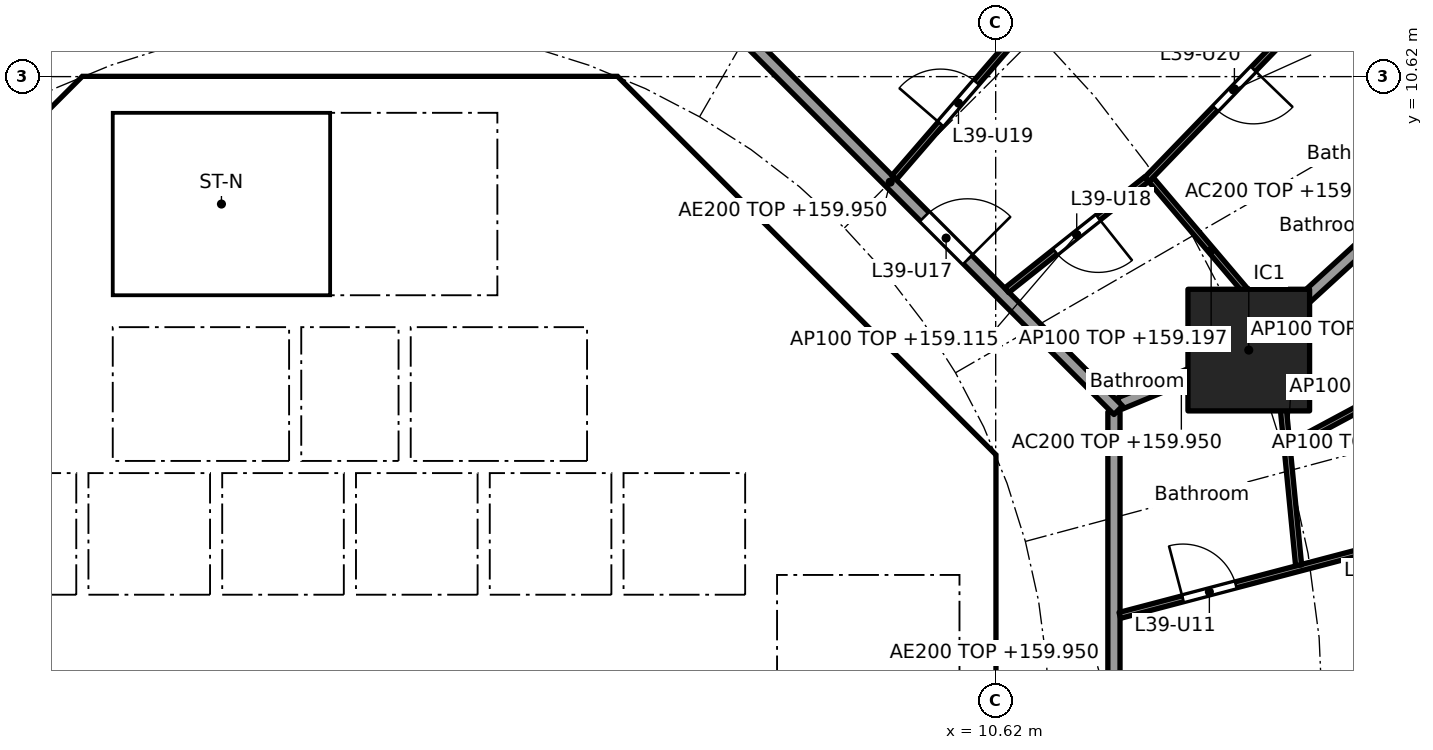
"""IFC4 building model, lengths in metres.
Left out: names, types, materials, properties, quantities, classifications, styles, units other than length and angle.
Written with IfcOpenShell. Run it as: python <this file> out.ifc"""

import sys

from ifc_helpers import new_model, si_unit, direction, frame, frame_2d, origin, origin_2d, place, context, subcontext, project, spatial, polyline, rectangle, outline, extrude, element, fill, save


model = new_model("IFC4")
c1 = context("Model", 3, precision=1e-05, world=origin(), true_north=direction((0.0, 1.0)))
c2 = subcontext(c1, "Body", "Model", "MODEL_VIEW")
j1 = project(units=[si_unit("LENGTHUNIT", "METRE"), si_unit("PLANEANGLEUNIT", "RADIAN")], contexts=[c1])
p1 = place(None, origin())
s1 = spatial("IfcSite", under=j1, at=p1, CompositionType="ELEMENT")
p2 = place(p1, origin())
s2 = spatial("IfcBuilding", under=s1, at=p2, CompositionType="ELEMENT")
p3 = place(p2, frame((0.0, 0.0, 156.6)))
s3 = spatial("IfcBuildingStorey", under=s2, at=p3, CompositionType="ELEMENT", Elevation=156.6)
p4 = place(p3, frame((14.782, 6.123, 0.0), z_axis=(0.0, 0.0, 1.0), x_axis=(1.0, 0.0, 0.0)))
e1 = element("IfcColumn", 1, at=p4, inside=s3, PredefinedType="COLUMN", context=c2, shape_type="SweptSolid", body=[
    extrude(rectangle(XDim=2.0, YDim=2.0, at=origin_2d()), origin(), (0.0, 0.0, 1.0), 3.7),
])
p5 = place(p3, frame((9.988, 4.613, 0.0), z_axis=(0.0, 0.0, 1.0), x_axis=(-0.707106781187, 0.707106781187, 0.0)))
e2 = element("IfcWall", 2, at=p5, inside=s3, PredefinedType="SHEAR", context=c2, shape_type="SweptSolid", body=[
    extrude(rectangle(XDim=7.602, YDim=0.6, at=frame_2d((3.801, 0.0))), origin(), (0.0, 0.0, 1.0), 3.35),
])
p6 = place(p5, frame((3.201, 0.0, 0.0)))
e3 = element("IfcOpeningElement", 3, at=p6, cuts=e2, PredefinedType="OPENING", context=c2, shape_type="SweptSolid", body=[
    extrude(rectangle(XDim=1.2, YDim=2.1, at=frame_2d((0.6, 1.05))), frame((0.0, 0.31, 0.0), z_axis=(0.0, -1.0, 0.0), x_axis=(1.0, 0.0, 0.0)), (0.0, 0.0, 1.0), 0.62),
])
p7 = place(p3, frame((-4.613, 9.988, 0.0), z_axis=(0.0, 0.0, 1.0), x_axis=(-0.707106781187, -0.707106781187, 0.0)))
e4 = element("IfcWall", 4, at=p7, inside=s3, PredefinedType="SHEAR", context=c2, shape_type="SweptSolid", body=[
    extrude(rectangle(XDim=7.602, YDim=0.6, at=frame_2d((3.801, 0.0))), origin(), (0.0, 0.0, 1.0), 3.35),
])
p8 = place(p7, frame((0.351, 0.0, 0.0)))
e5 = element("IfcOpeningElement", 5, at=p8, cuts=e4, PredefinedType="OPENING", context=c2, shape_type="SweptSolid", body=[
    extrude(rectangle(XDim=1.1, YDim=2.1, at=frame_2d((0.55, 1.05))), frame((0.0, 0.31, 0.0), z_axis=(0.0, -1.0, 0.0), x_axis=(1.0, 0.0, 0.0)), (0.0, 0.0, 1.0), 0.62),
])
p9 = place(p3, frame((4.0, 4.3, 0.0), z_axis=(0.0, 0.0, 1.0), x_axis=(0.0, 1.0, 0.0)))
e6 = element("IfcWall", 6, at=p9, inside=s3, PredefinedType="SOLIDWALL", context=c2, shape_type="SweptSolid", body=[
    extrude(rectangle(XDim=2.2, YDim=0.2, at=frame_2d((1.1, 0.0))), origin(), (0.0, 0.0, 1.0), 3.35),
])
p10 = place(p9, frame((0.55, 0.0, 0.0)))
e7 = element("IfcOpeningElement", 7, at=p10, cuts=e6, PredefinedType="OPENING", context=c2, shape_type="SweptSolid", body=[
    extrude(rectangle(XDim=1.1, YDim=2.1, at=frame_2d((0.55, 1.05))), frame((0.0, 0.11, 0.0), z_axis=(0.0, -1.0, 0.0), x_axis=(1.0, 0.0, 0.0)), (0.0, 0.0, 1.0), 0.22),
])
p11 = place(p3, frame((-4.0, 4.3, 0.0), z_axis=(0.0, 0.0, 1.0), x_axis=(0.0, 1.0, 0.0)))
e8 = element("IfcWall", 8, at=p11, inside=s3, PredefinedType="SOLIDWALL", context=c2, shape_type="SweptSolid", body=[
    extrude(rectangle(XDim=2.2, YDim=0.2, at=frame_2d((1.1, 0.0))), origin(), (0.0, 0.0, 1.0), 3.35),
])
p12 = place(p11, frame((0.55, 0.0, 0.0)))
e9 = element("IfcOpeningElement", 9, at=p12, cuts=e8, PredefinedType="OPENING", context=c2, shape_type="SweptSolid", body=[
    extrude(rectangle(XDim=1.1, YDim=2.1, at=frame_2d((0.55, 1.05))), frame((0.0, 0.11, 0.0), z_axis=(0.0, -1.0, 0.0), x_axis=(1.0, 0.0, 0.0)), (0.0, 0.0, 1.0), 0.22),
])
p13 = place(p3, frame((-6.7, 2.0, 0.0), z_axis=(0.0, 0.0, 1.0), x_axis=(1.0, 0.0, 0.0)))
e10 = element("IfcWall", 10, at=p13, inside=s3, PredefinedType="SOLIDWALL", context=c2, shape_type="SweptSolid", body=[
    extrude(rectangle(XDim=13.4, YDim=0.2, at=frame_2d((6.7, 0.0))), origin(), (0.0, 0.0, 1.0), 3.35),
])
p14 = place(p13, frame((0.65, 0.0, 0.0)))
e11 = element("IfcOpeningElement", 11, at=p14, cuts=e10, PredefinedType="OPENING", context=c2, shape_type="SweptSolid", body=[
    extrude(rectangle(XDim=1.1, YDim=2.1, at=frame_2d((0.55, 1.05))), frame((0.0, 0.11, 0.0), z_axis=(0.0, -1.0, 0.0), x_axis=(1.0, 0.0, 0.0)), (0.0, 0.0, 1.0), 0.22),
])
p15 = place(p13, frame((2.85, 0.0, 0.0)))
e12 = element("IfcOpeningElement", 12, at=p15, cuts=e10, PredefinedType="OPENING", context=c2, shape_type="SweptSolid", body=[
    extrude(rectangle(XDim=1.1, YDim=2.1, at=frame_2d((0.55, 1.05))), frame((0.0, 0.11, 0.0), z_axis=(0.0, -1.0, 0.0), x_axis=(1.0, 0.0, 0.0)), (0.0, 0.0, 1.0), 0.22),
])
p16 = place(p13, frame((5.05, 0.0, 0.0)))
e13 = element("IfcOpeningElement", 13, at=p16, cuts=e10, PredefinedType="OPENING", context=c2, shape_type="SweptSolid", body=[
    extrude(rectangle(XDim=1.1, YDim=2.1, at=frame_2d((0.55, 1.05))), frame((0.0, 0.11, 0.0), z_axis=(0.0, -1.0, 0.0), x_axis=(1.0, 0.0, 0.0)), (0.0, 0.0, 1.0), 0.22),
])
p17 = place(p3, frame((6.7, 4.0, 0.0), z_axis=(0.0, 0.0, 1.0), x_axis=(1.0, 0.0, 0.0)))
e14 = element("IfcWall", 14, at=p17, inside=s3, PredefinedType="SOLIDWALL", context=c2, shape_type="SweptSolid", body=[
    extrude(rectangle(XDim=3.325, YDim=0.2, at=frame_2d((1.662, 0.0))), origin(), (0.0, 0.0, 1.0), 3.35),
])
p18 = place(p17, frame((1.25, 0.0, 0.0)))
e15 = element("IfcOpeningElement", 15, at=p18, cuts=e14, PredefinedType="OPENING", context=c2, shape_type="SweptSolid", body=[
    extrude(rectangle(XDim=1.1, YDim=2.1, at=frame_2d((0.55, 1.05))), frame((0.0, 0.11, 0.0), z_axis=(0.0, -1.0, 0.0), x_axis=(1.0, 0.0, 0.0)), (0.0, 0.0, 1.0), 0.22),
])
p19 = place(p3, frame((4.0, 7.025, 0.0), z_axis=(0.0, 0.0, 1.0), x_axis=(0.0, 1.0, 0.0)))
e16 = element("IfcWall", 16, at=p19, inside=s3, PredefinedType="SOLIDWALL", context=c2, shape_type="SweptSolid", body=[
    extrude(rectangle(XDim=3.0, YDim=0.2, at=frame_2d((1.5, 0.0))), origin(), (0.0, 0.0, 1.0), 3.35),
])
p20 = place(p19, frame((0.925, 0.0, 0.0)))
e17 = element("IfcOpeningElement", 17, at=p20, cuts=e16, PredefinedType="OPENING", context=c2, shape_type="SweptSolid", body=[
    extrude(rectangle(XDim=1.1, YDim=2.1, at=frame_2d((0.55, 1.05))), frame((0.0, 0.11, 0.0), z_axis=(0.0, -1.0, 0.0), x_axis=(1.0, 0.0, 0.0)), (0.0, 0.0, 1.0), 0.22),
])
p21 = place(p3, origin())
e18 = element("IfcWall", 18, at=p21, inside=s3, PredefinedType="SHEAR", context=c2, shape_type="SweptSolid", body=[
    extrude(outline(polyline([(-4.152, 10.025), (-4.401, 9.776), (-4.825, 10.2), (-4.401, 10.625), (4.401, 10.625), (4.825, 10.2), (4.401, 9.776), (4.152, 10.025), (-4.152, 10.025)])), origin(), (0.0, 0.0, 1.0), 3.35),
])
p22 = place(p3, origin())
e19 = element("IfcWall", 19, at=p22, inside=s3, PredefinedType="SHEAR", context=c2, shape_type="SweptSolid", body=[
    extrude(outline(polyline([(9.776, -4.401), (10.025, -4.152), (10.025, -3.801), (10.025, 4.152), (9.776, 4.401), (10.2, 4.825), (10.625, 4.401), (10.625, -4.401), (10.2, -4.825), (9.776, -4.401)])), origin(), (0.0, 0.0, 1.0), 3.35),
])
for number, where, z_axis, x_axis in (
    (20, (-0.9, 4.3, 0.0), (0.0, 0.0, 1.0), (0.0, 1.0, 0.0)),
    (21, (0.9, 4.3, 0.0), (0.0, 0.0, 1.0), (0.0, 1.0, 0.0)),
):
    element("IfcWall", number, at=place(p3, frame(where, z_axis=z_axis, x_axis=x_axis)), inside=s3, PredefinedType="SOLIDWALL", context=c2, shape_type="SweptSolid", body=[
        extrude(rectangle(XDim=2.2, YDim=0.2, at=frame_2d((1.1, 0.0))), origin(), (0.0, 0.0, 1.0), 3.35),
    ])
p23 = place(p3, origin())
e22 = element("IfcWall", 22, at=p23, inside=s3, PredefinedType="SOLIDWALL", context=c2, shape_type="SweptSolid", body=[
    extrude(outline(polyline([(-6.5, 2.1), (-6.7, 2.1), (-6.7, 4.3), (6.7, 4.3), (6.7, 2.1), (6.5, 2.1), (6.5, 4.1), (4.5, 4.1), (4.5, 2.1), (4.3, 2.1), (4.3, 4.1), (2.3, 4.1), (2.3, 2.1), (2.1, 2.1), (2.1, 4.1), (0.1, 4.1), (0.1, 2.1), (-0.1, 2.1), (-0.1, 4.1), (-2.1, 4.1), (-2.1, 2.1), (-2.3, 2.1), (-2.3, 4.1), (-4.3, 4.1), (-4.3, 2.1), (-4.5, 2.1), (-4.5, 4.1), (-6.5, 4.1), (-6.5, 2.1)])), origin(), (0.0, 0.0, 1.0), 3.35),
])
p24 = place(p3, origin())
e23 = element("IfcWall", 23, at=p24, inside=s3, PredefinedType="SOLIDWALL", context=c2, shape_type="SweptSolid", body=[
    extrude(outline(polyline([(-3.9, 7.025), (-4.1, 7.025), (-4.1, 10.025), (-3.9, 10.025), (-3.9, 7.025)])), origin(), (0.0, 0.0, 1.0), 3.35),
])
p25 = place(p3, origin())
e24 = element("IfcWall", 24, at=p25, inside=s3, PredefinedType="SOLIDWALL", context=c2, shape_type="SweptSolid", body=[
    extrude(outline(polyline([(4.1, 6.5), (-4.1, 6.5), (-4.1, 7.025), (4.1, 7.025), (4.1, 6.5)])), origin(), (0.0, 0.0, 1.0), 3.35),
])
p26 = place(p3, origin())
e25 = element("IfcWall", 25, at=p26, inside=s3, PredefinedType="SOLIDWALL", context=c2, shape_type="SweptSolid", body=[
    extrude(outline(polyline([(7.025, -3.9), (6.7, -3.9), (6.7, 3.9), (7.025, 3.9), (7.025, -3.9)])), origin(), (0.0, 0.0, 1.0), 3.35),
])
p27 = place(p3, frame((12.657, 5.243, 0.0), z_axis=(0.0, 0.0, 1.0), x_axis=(0.923876145736, 0.382691608661, 0.0)))
e26 = element("IfcWall", 26, at=p27, inside=s3, PredefinedType="PARTITIONING", context=c2, shape_type="SweptSolid", body=[
    extrude(rectangle(XDim=2.2, YDim=0.2, at=frame_2d((1.1, 0.0))), origin(), (0.0, 0.0, 1.0), 3.35),
])
p28 = place(p3, frame((14.819, 6.157, 0.0), z_axis=(0.0, 0.0, 1.0), x_axis=(0.737608883396, 0.675228209671, 0.0)))
e27 = element("IfcWall", 27, at=p28, inside=s3, PredefinedType="PARTITIONING", context=c2, shape_type="SweptSolid", body=[
    extrude(rectangle(XDim=7.596, YDim=0.2, at=frame_2d((3.798, 0.0))), origin(), (0.0, 0.0, 1.0), 3.35),
])
p29 = place(p3, frame((12.565, -5.104, 0.0), z_axis=(0.0, 0.0, 1.0), x_axis=(0.0, 1.0, 0.0)))
e28 = element("IfcWall", 28, at=p29, inside=s3, PredefinedType="PARTITIONING", context=c2, shape_type="SweptSolid", body=[
    extrude(rectangle(XDim=10.209, YDim=0.2, at=frame_2d((5.104, 0.0))), origin(), (0.0, 0.0, 1.0), 3.35),
])
p30 = place(p29, frame((4.604, 0.0, 0.0)))
e29 = element("IfcOpeningElement", 29, at=p30, cuts=e28, PredefinedType="OPENING", context=c2, shape_type="SweptSolid", body=[
    extrude(rectangle(XDim=1.0, YDim=2.1, at=frame_2d((0.5, 1.05))), frame((0.0, 0.11, 0.0), z_axis=(0.0, -1.0, 0.0), x_axis=(1.0, 0.0, 0.0)), (0.0, 0.0, 1.0), 0.22),
])
p31 = place(p3, frame((12.635, 5.134, 0.0), z_axis=(0.0, 0.0, 1.0), x_axis=(-0.707106781187, 0.707106781187, 0.0)))
e30 = element("IfcWall", 30, at=p31, inside=s3, PredefinedType="PARTITIONING", context=c2, shape_type="SweptSolid", body=[
    extrude(rectangle(XDim=10.609, YDim=0.2, at=frame_2d((5.305, 0.0))), origin(), (0.0, 0.0, 1.0), 3.35),
])
p32 = place(p31, frame((3.503, 0.0, 0.0)))
e31 = element("IfcOpeningElement", 31, at=p32, cuts=e30, PredefinedType="OPENING", context=c2, shape_type="SweptSolid", body=[
    extrude(rectangle(XDim=1.0, YDim=2.1, at=frame_2d((0.5, 1.05))), frame((0.0, 0.11, 0.0), z_axis=(0.0, -1.0, 0.0), x_axis=(1.0, 0.0, 0.0)), (0.0, 0.0, 1.0), 0.22),
])
p33 = place(p3, frame((12.661, 1.76, 0.0), z_axis=(0.0, 0.0, 1.0), x_axis=(0.967120304949, 0.254319318488, 0.0)))
e32 = element("IfcWall", 32, at=p33, inside=s3, PredefinedType="PARTITIONING", context=c2, shape_type="SweptSolid", body=[
    extrude(rectangle(XDim=10.499, YDim=0.1, at=frame_2d((5.25, 0.0))), origin(), (0.0, 0.0, 1.0), 2.515),
])
p34 = place(p33, frame((1.073, 0.0, 0.0)))
e33 = element("IfcOpeningElement", 33, at=p34, cuts=e32, PredefinedType="OPENING", context=c2, shape_type="SweptSolid", body=[
    extrude(rectangle(XDim=0.9, YDim=2.1, at=frame_2d((0.45, 1.05))), frame((0.0, 0.06, 0.0), z_axis=(0.0, -1.0, 0.0), x_axis=(1.0, 0.0, 0.0)), (0.0, 0.0, 1.0), 0.12),
])
p35 = place(p33, frame((4.634, 0.0, 0.0)))
e34 = element("IfcOpeningElement", 34, at=p35, cuts=e32, PredefinedType="OPENING", context=c2, shape_type="SweptSolid", body=[
    extrude(rectangle(XDim=0.9, YDim=2.1, at=frame_2d((0.45, 1.05))), frame((0.0, 0.06, 0.0), z_axis=(0.0, -1.0, 0.0), x_axis=(1.0, 0.0, 0.0)), (0.0, 0.0, 1.0), 0.12),
])
p36 = place(p33, frame((8.361, 0.0, 0.0)))
e35 = element("IfcOpeningElement", 35, at=p36, cuts=e32, PredefinedType="OPENING", context=c2, shape_type="SweptSolid", body=[
    extrude(rectangle(XDim=0.9, YDim=2.1, at=frame_2d((0.45, 1.05))), frame((0.0, 0.06, 0.0), z_axis=(0.0, -1.0, 0.0), x_axis=(1.0, 0.0, 0.0)), (0.0, 0.0, 1.0), 0.12),
])
p37 = place(p3, frame((15.602, 2.584, 0.0), z_axis=(0.0, 0.0, 1.0), x_axis=(-0.097196343206, 0.995265226393, 0.0)))
e36 = element("IfcWall", 36, at=p37, inside=s3, PredefinedType="PARTITIONING", context=c2, shape_type="SweptSolid", body=[
    extrude(rectangle(XDim=3.856, YDim=0.1, at=frame_2d((1.928, 0.0))), origin(), (0.0, 0.0, 1.0), 2.597),
])
p38 = place(p3, frame((15.456, 4.552, 0.0), z_axis=(0.0, 0.0, 1.0), x_axis=(0.8809418045, 0.473224615889, 0.0)))
e37 = element("IfcWall", 37, at=p38, inside=s3, PredefinedType="PARTITIONING", context=c2, shape_type="SweptSolid", body=[
    extrude(rectangle(XDim=3.76, YDim=0.1, at=frame_2d((1.88, 0.0))), origin(), (0.0, 0.0, 1.0), 3.35),
])
p39 = place(p3, frame((15.153, 6.597, 0.0), z_axis=(0.0, 0.0, 1.0), x_axis=(-0.647384064422, 0.762163941113, 0.0)))
e38 = element("IfcWall", 38, at=p39, inside=s3, PredefinedType="PARTITIONING", context=c2, shape_type="SweptSolid", body=[
    extrude(rectangle(XDim=3.057, YDim=0.1, at=frame_2d((1.528, 0.0))), origin(), (0.0, 0.0, 1.0), 2.597),
])
p40 = place(p3, frame((18.016, 9.218, 0.0), z_axis=(0.0, 0.0, 1.0), x_axis=(-0.602406473922, 0.798189476363, 0.0)))
e39 = element("IfcWall", 39, at=p40, inside=s3, PredefinedType="PARTITIONING", context=c2, shape_type="SweptSolid", body=[
    extrude(rectangle(XDim=6.794, YDim=0.1, at=frame_2d((3.397, 0.0))), origin(), (0.0, 0.0, 1.0), 2.597),
])
p41 = place(p40, frame((4.633, 0.0, 0.0)))
e40 = element("IfcOpeningElement", 40, at=p41, cuts=e39, PredefinedType="OPENING", context=c2, shape_type="SweptSolid", body=[
    extrude(rectangle(XDim=0.9, YDim=2.1, at=frame_2d((0.45, 1.05))), frame((0.0, 0.06, 0.0), z_axis=(0.0, -1.0, 0.0), x_axis=(1.0, 0.0, 0.0)), (0.0, 0.0, 1.0), 0.12),
])
p42 = place(p3, frame((10.803, 7.107, 0.0), z_axis=(0.0, 0.0, 1.0), x_axis=(0.782908385935, 0.622137010017, 0.0)))
e41 = element("IfcWall", 41, at=p42, inside=s3, PredefinedType="PARTITIONING", context=c2, shape_type="SweptSolid", body=[
    extrude(rectangle(XDim=2.937, YDim=0.1, at=frame_2d((1.469, 0.0))), origin(), (0.0, 0.0, 1.0), 2.515),
])
p43 = place(p42, frame((1.019, 0.0, 0.0)))
e42 = element("IfcOpeningElement", 42, at=p43, cuts=e41, PredefinedType="OPENING", context=c2, shape_type="SweptSolid", body=[
    extrude(rectangle(XDim=0.9, YDim=2.1, at=frame_2d((0.45, 1.05))), frame((0.0, 0.06, 0.0), z_axis=(0.0, -1.0, 0.0), x_axis=(1.0, 0.0, 0.0)), (0.0, 0.0, 1.0), 0.12),
])
p44 = place(p3, frame((13.107, 8.929, 0.0), z_axis=(0.0, 0.0, 1.0), x_axis=(0.694592384931, 0.719403515974, 0.0)))
e43 = element("IfcWall", 43, at=p44, inside=s3, PredefinedType="PARTITIONING", context=c2, shape_type="SweptSolid", body=[
    extrude(rectangle(XDim=4.094, YDim=0.1, at=frame_2d((2.047, 0.0))), origin(), (0.0, 0.0, 1.0), 3.35),
])
p45 = place(p44, frame((1.622, 0.0, 0.0)))
e44 = element("IfcOpeningElement", 44, at=p45, cuts=e43, PredefinedType="OPENING", context=c2, shape_type="SweptSolid", body=[
    extrude(rectangle(XDim=0.9, YDim=2.1, at=frame_2d((0.45, 1.05))), frame((0.0, 0.06, 0.0), z_axis=(0.0, -1.0, 0.0), x_axis=(1.0, 0.0, 0.0)), (0.0, 0.0, 1.0), 0.12),
])
p46 = place(p3, frame((8.95, 8.96, 0.0), z_axis=(0.0, 0.0, 1.0), x_axis=(0.653830241148, 0.756641272837, 0.0)))
e45 = element("IfcWall", 45, at=p46, inside=s3, PredefinedType="PARTITIONING", context=c2, shape_type="SweptSolid", body=[
    extrude(rectangle(XDim=11.208, YDim=0.1, at=frame_2d((5.604, 0.0))), origin(), (0.0, 0.0, 1.0), 2.515),
])
p47 = place(p46, frame((1.168, 0.0, 0.0)))
e46 = element("IfcOpeningElement", 46, at=p47, cuts=e45, PredefinedType="OPENING", context=c2, shape_type="SweptSolid", body=[
    extrude(rectangle(XDim=0.9, YDim=2.1, at=frame_2d((0.45, 1.05))), frame((0.0, 0.06, 0.0), z_axis=(0.0, -1.0, 0.0), x_axis=(1.0, 0.0, 0.0)), (0.0, 0.0, 1.0), 0.12),
])
p48 = place(p46, frame((4.948, 0.0, 0.0)))
e47 = element("IfcOpeningElement", 47, at=p48, cuts=e45, PredefinedType="OPENING", context=c2, shape_type="SweptSolid", body=[
    extrude(rectangle(XDim=0.9, YDim=2.1, at=frame_2d((0.45, 1.05))), frame((0.0, 0.06, 0.0), z_axis=(0.0, -1.0, 0.0), x_axis=(1.0, 0.0, 0.0)), (0.0, 0.0, 1.0), 0.12),
])
p49 = place(p15, origin())
e48 = element("IfcDoor", 48, at=p49, inside=s3, OperationType="DOUBLE_DOOR_SLIDING", PredefinedType="DOOR", context=c2, shape_type="SweptSolid", body=[
    extrude(rectangle(XDim=1.1, YDim=2.1, at=frame_2d((0.55, 1.05))), frame((0.0, 0.025, 0.0), z_axis=(0.0, -1.0, 0.0), x_axis=(1.0, 0.0, 0.0)), (0.0, 0.0, 1.0), 0.05),
])
fill(e12, e48)
p50 = place(p16, origin())
e49 = element("IfcDoor", 49, at=p50, inside=s3, OperationType="DOUBLE_DOOR_SLIDING", PredefinedType="DOOR", context=c2, shape_type="SweptSolid", body=[
    extrude(rectangle(XDim=1.1, YDim=2.1, at=frame_2d((0.55, 1.05))), frame((0.0, 0.025, 0.0), z_axis=(0.0, -1.0, 0.0), x_axis=(1.0, 0.0, 0.0)), (0.0, 0.0, 1.0), 0.05),
])
fill(e13, e49)
p51 = place(p10, origin())
e50 = element("IfcDoor", 50, at=p51, inside=s3, OperationType="DOUBLE_DOOR_SLIDING", PredefinedType="DOOR", context=c2, shape_type="SweptSolid", body=[
    extrude(rectangle(XDim=1.1, YDim=2.1, at=frame_2d((0.55, 1.05))), frame((0.0, 0.025, 0.0), z_axis=(0.0, -1.0, 0.0), x_axis=(1.0, 0.0, 0.0)), (0.0, 0.0, 1.0), 0.05),
])
fill(e7, e50)
p52 = place(p12, origin())
e51 = element("IfcDoor", 51, at=p52, inside=s3, OperationType="DOUBLE_DOOR_SLIDING", PredefinedType="DOOR", context=c2, shape_type="SweptSolid", body=[
    extrude(rectangle(XDim=1.1, YDim=2.1, at=frame_2d((0.55, 1.05))), frame((0.0, 0.025, 0.0), z_axis=(0.0, -1.0, 0.0), x_axis=(1.0, 0.0, 0.0)), (0.0, 0.0, 1.0), 0.05),
])
fill(e9, e51)
p53 = place(p18, frame((1.1, 0.0, 0.0), x_axis=(-1.0, 0.0, 0.0)))
e52 = element("IfcDoor", 52, at=p53, inside=s3, OperationType="SINGLE_SWING_LEFT", PredefinedType="DOOR", context=c2, shape_type="SweptSolid", body=[
    extrude(rectangle(XDim=1.1, YDim=2.1, at=frame_2d((0.55, 1.05))), frame((0.0, 0.025, 0.0), z_axis=(0.0, -1.0, 0.0), x_axis=(1.0, 0.0, 0.0)), (0.0, 0.0, 1.0), 0.05),
])
fill(e15, e52)
p54 = place(p20, origin())
e53 = element("IfcDoor", 53, at=p54, inside=s3, OperationType="SINGLE_SWING_RIGHT", PredefinedType="DOOR", context=c2, shape_type="SweptSolid", body=[
    extrude(rectangle(XDim=1.1, YDim=2.1, at=frame_2d((0.55, 1.05))), frame((0.0, 0.025, 0.0), z_axis=(0.0, -1.0, 0.0), x_axis=(1.0, 0.0, 0.0)), (0.0, 0.0, 1.0), 0.05),
])
fill(e17, e53)
p55 = place(p6, origin())
e54 = element("IfcDoor", 54, at=p55, inside=s3, OperationType="SINGLE_SWING_LEFT", PredefinedType="DOOR", context=c2, shape_type="SweptSolid", body=[
    extrude(rectangle(XDim=1.2, YDim=2.1, at=frame_2d((0.6, 1.05))), frame((0.0, 0.025, 0.0), z_axis=(0.0, -1.0, 0.0), x_axis=(1.0, 0.0, 0.0)), (0.0, 0.0, 1.0), 0.05),
])
fill(e3, e54)
p56 = place(p8, origin())
e55 = element("IfcDoor", 55, at=p56, inside=s3, OperationType="SINGLE_SWING_LEFT", PredefinedType="DOOR", context=c2, shape_type="SweptSolid", body=[
    extrude(rectangle(XDim=1.1, YDim=2.1, at=frame_2d((0.55, 1.05))), frame((0.0, 0.025, 0.0), z_axis=(0.0, -1.0, 0.0), x_axis=(1.0, 0.0, 0.0)), (0.0, 0.0, 1.0), 0.05),
])
fill(e5, e55)
p57 = place(p34, origin())
e56 = element("IfcDoor", 56, at=p57, inside=s3, OperationType="SINGLE_SWING_LEFT", PredefinedType="DOOR", context=c2, shape_type="SweptSolid", body=[
    extrude(rectangle(XDim=0.9, YDim=2.1, at=frame_2d((0.45, 1.05))), frame((0.0, 0.025, 0.0), z_axis=(0.0, -1.0, 0.0), x_axis=(1.0, 0.0, 0.0)), (0.0, 0.0, 1.0), 0.05),
])
fill(e33, e56)
p58 = place(p32, frame((1.0, 0.0, 0.0), x_axis=(-1.0, 0.0, 0.0)))
e57 = element("IfcDoor", 57, at=p58, inside=s3, OperationType="SINGLE_SWING_RIGHT", PredefinedType="DOOR", context=c2, shape_type="SweptSolid", body=[
    extrude(rectangle(XDim=1.0, YDim=2.1, at=frame_2d((0.5, 1.05))), frame((0.0, 0.025, 0.0), z_axis=(0.0, -1.0, 0.0), x_axis=(1.0, 0.0, 0.0)), (0.0, 0.0, 1.0), 0.05),
])
fill(e31, e57)
p59 = place(p43, frame((0.9, 0.0, 0.0), x_axis=(-1.0, 0.0, 0.0)))
e58 = element("IfcDoor", 58, at=p59, inside=s3, OperationType="SINGLE_SWING_LEFT", PredefinedType="DOOR", context=c2, shape_type="SweptSolid", body=[
    extrude(rectangle(XDim=0.9, YDim=2.1, at=frame_2d((0.45, 1.05))), frame((0.0, 0.025, 0.0), z_axis=(0.0, -1.0, 0.0), x_axis=(1.0, 0.0, 0.0)), (0.0, 0.0, 1.0), 0.05),
])
fill(e42, e58)
p60 = place(p47, origin())
e59 = element("IfcDoor", 59, at=p60, inside=s3, OperationType="SINGLE_SWING_LEFT", PredefinedType="DOOR", context=c2, shape_type="SweptSolid", body=[
    extrude(rectangle(XDim=0.9, YDim=2.1, at=frame_2d((0.45, 1.05))), frame((0.0, 0.025, 0.0), z_axis=(0.0, -1.0, 0.0), x_axis=(1.0, 0.0, 0.0)), (0.0, 0.0, 1.0), 0.05),
])
fill(e46, e59)
p61 = place(p45, frame((0.9, 0.0, 0.0), x_axis=(-1.0, 0.0, 0.0)))
e60 = element("IfcDoor", 60, at=p61, inside=s3, OperationType="SINGLE_SWING_LEFT", PredefinedType="DOOR", context=c2, shape_type="SweptSolid", body=[
    extrude(rectangle(XDim=0.9, YDim=2.1, at=frame_2d((0.45, 1.05))), frame((0.0, 0.025, 0.0), z_axis=(0.0, -1.0, 0.0), x_axis=(1.0, 0.0, 0.0)), (0.0, 0.0, 1.0), 0.05),
])
fill(e44, e60)
save(model, sys.argv[1])
